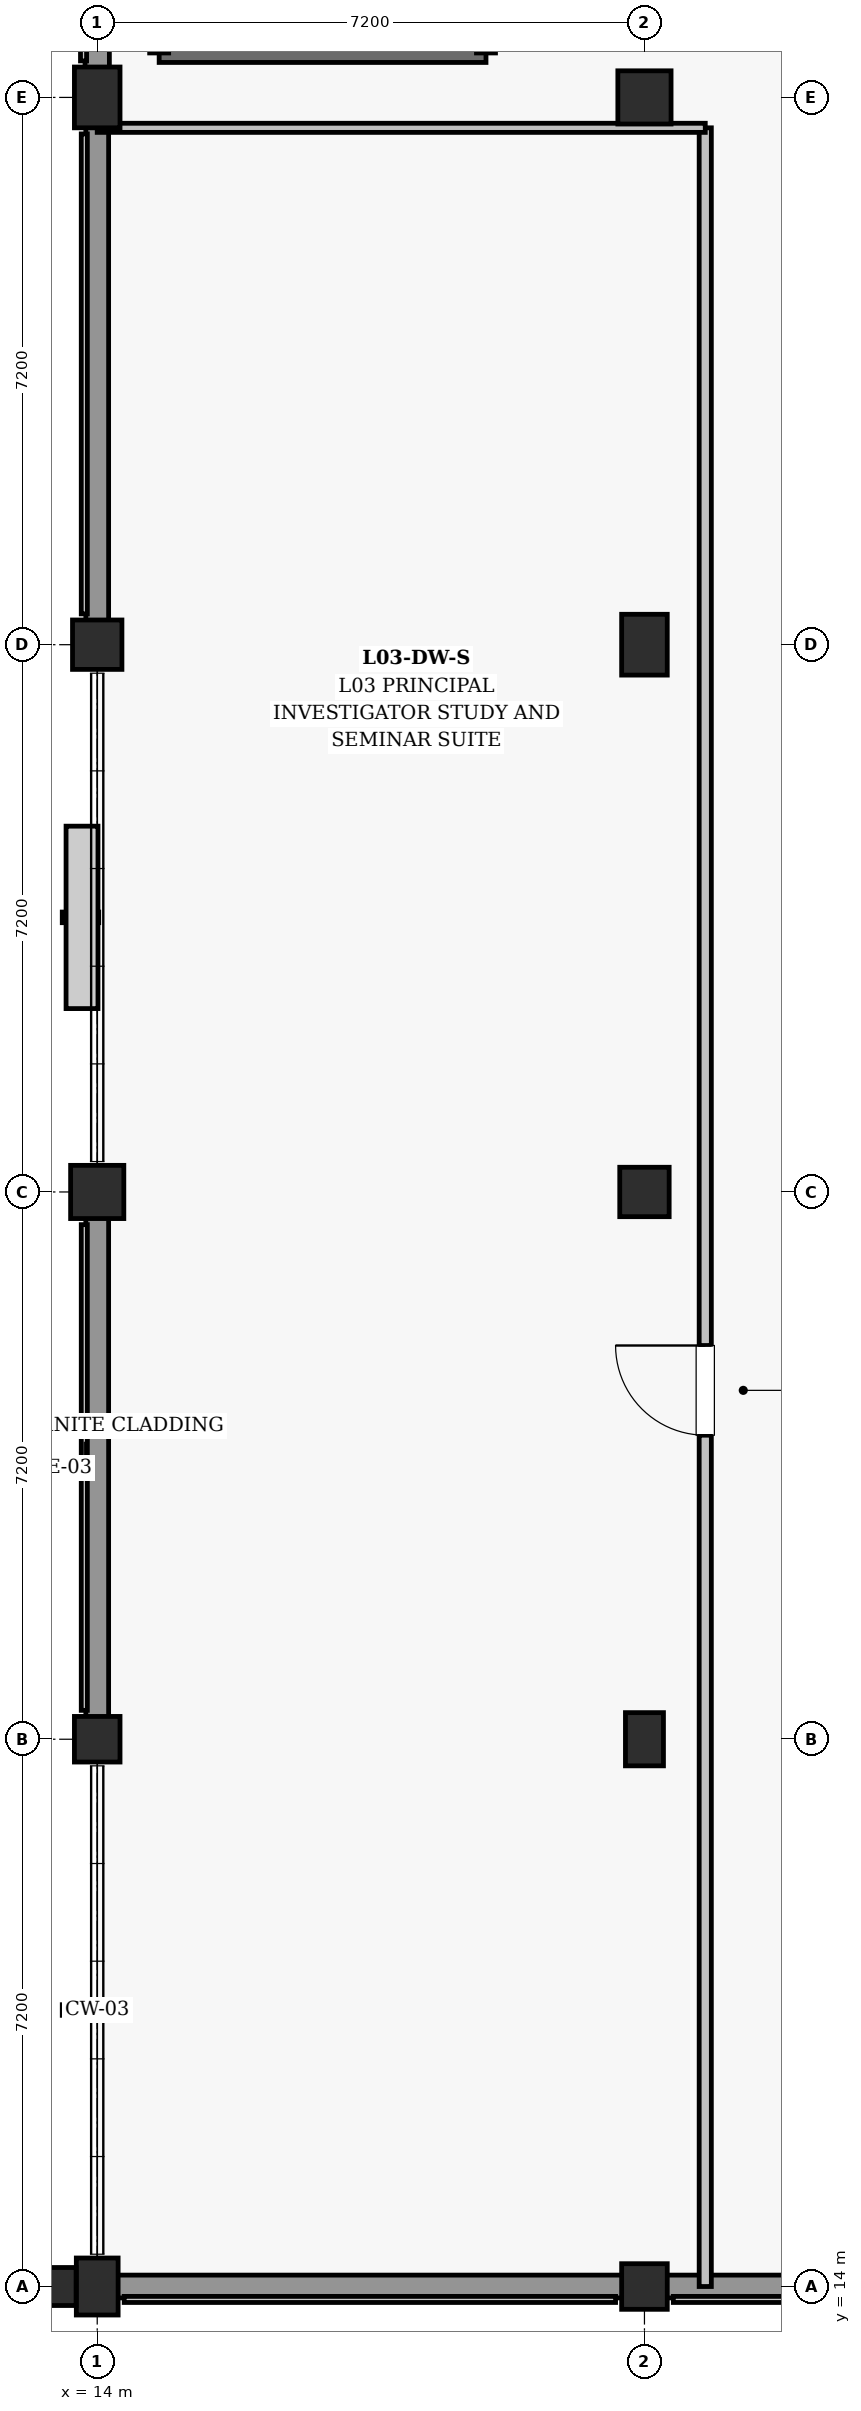
"""IFC4 building model, lengths in metres.
Left out: names, types, materials, properties, quantities, classifications, styles, units other than length and angle.
Written with IfcOpenShell. Run it as: python <this file> out.ifc"""

import sys

from ifc_helpers import new_model, si_unit, direction, frame, frame_2d, origin, origin_2d, place, context, subcontext, project, spatial, rectangle, extrude, element, fill, save


model = new_model("IFC4")
c1 = context("Model", 3, precision=1e-05, world=origin(), true_north=direction((0.0, 1.0)))
c2 = subcontext(c1, "Body", "Model", "MODEL_VIEW")
j1 = project(units=[si_unit("LENGTHUNIT", "METRE"), si_unit("PLANEANGLEUNIT", "RADIAN")], contexts=[c1])
p1 = place(None, origin())
s1 = spatial("IfcSite", under=j1, at=p1, CompositionType="ELEMENT")
p2 = place(p1, origin())
s2 = spatial("IfcBuilding", under=s1, at=p2, CompositionType="ELEMENT")
p3 = place(p2, frame((0.0, 0.0, 14.4)))
s3 = spatial("IfcBuildingStorey", under=s2, at=p3, CompositionType="ELEMENT", Elevation=14.4)
p4 = place(p3, frame((14.0, 14.0, 0.0), z_axis=(0.0, 0.0, 1.0), x_axis=(1.0, 0.0, 0.0)))
e1 = element("IfcColumn", 1, at=p4, inside=s3, PredefinedType="COLUMN", context=c2, shape_type="SweptSolid", body=[
    extrude(rectangle(XDim=0.55, YDim=0.75, at=origin_2d()), origin(), (0.0, 0.0, 1.0), 4.5),
])
p5 = place(p3, frame((14.0, 21.2, 0.0), z_axis=(0.0, 0.0, 1.0), x_axis=(1.0, 0.0, 0.0)))
e2 = element("IfcColumn", 2, at=p5, inside=s3, PredefinedType="COLUMN", context=c2, shape_type="SweptSolid", body=[
    extrude(rectangle(XDim=0.6, YDim=0.6, at=origin_2d()), origin(), (0.0, 0.0, 1.0), 4.5),
])
p6 = place(p3, frame((14.0, 28.4, 0.0), z_axis=(0.0, 0.0, 1.0), x_axis=(1.0, 0.0, 0.0)))
e3 = element("IfcColumn", 3, at=p6, inside=s3, PredefinedType="COLUMN", context=c2, shape_type="SweptSolid", body=[
    extrude(rectangle(XDim=0.7, YDim=0.7, at=origin_2d()), origin(), (0.0, 0.0, 1.0), 4.5),
])
p7 = place(p3, frame((14.0, 35.6, 0.0), z_axis=(0.0, 0.0, 1.0), x_axis=(1.0, 0.0, 0.0)))
e4 = element("IfcColumn", 4, at=p7, inside=s3, PredefinedType="COLUMN", context=c2, shape_type="SweptSolid", body=[
    extrude(rectangle(XDim=0.65, YDim=0.65, at=origin_2d()), origin(), (0.0, 0.0, 1.0), 4.5),
])
p8 = place(p3, frame((14.0, 42.8, 0.0), z_axis=(0.0, 0.0, 1.0), x_axis=(1.0, 0.0, 0.0)))
e5 = element("IfcColumn", 5, at=p8, inside=s3, PredefinedType="COLUMN", context=c2, shape_type="SweptSolid", body=[
    extrude(rectangle(XDim=0.6, YDim=0.8, at=origin_2d()), origin(), (0.0, 0.0, 1.0), 4.5),
])
p9 = place(p3, frame((21.2, 14.0, 0.0), z_axis=(0.0, 0.0, 1.0), x_axis=(1.0, 0.0, 0.0)))
e6 = element("IfcColumn", 6, at=p9, inside=s3, PredefinedType="COLUMN", context=c2, shape_type="SweptSolid", body=[
    extrude(rectangle(XDim=0.6, YDim=0.6, at=origin_2d()), origin(), (0.0, 0.0, 1.0), 4.5),
])
p10 = place(p3, frame((21.2, 21.2, 0.0), z_axis=(0.0, 0.0, 1.0), x_axis=(1.0, 0.0, 0.0)))
e7 = element("IfcColumn", 7, at=p10, inside=s3, PredefinedType="COLUMN", context=c2, shape_type="SweptSolid", body=[
    extrude(rectangle(XDim=0.5, YDim=0.7, at=origin_2d()), origin(), (0.0, 0.0, 1.0), 4.5),
])
p11 = place(p3, frame((21.2, 28.4, 0.0), z_axis=(0.0, 0.0, 1.0), x_axis=(1.0, 0.0, 0.0)))
e8 = element("IfcColumn", 8, at=p11, inside=s3, PredefinedType="COLUMN", context=c2, shape_type="SweptSolid", body=[
    extrude(rectangle(XDim=0.65, YDim=0.65, at=origin_2d()), origin(), (0.0, 0.0, 1.0), 4.5),
])
p12 = place(p3, frame((21.2, 35.6, 0.0), z_axis=(0.0, 0.0, 1.0), x_axis=(1.0, 0.0, 0.0)))
e9 = element("IfcColumn", 9, at=p12, inside=s3, PredefinedType="COLUMN", context=c2, shape_type="SweptSolid", body=[
    extrude(rectangle(XDim=0.6, YDim=0.8, at=origin_2d()), origin(), (0.0, 0.0, 1.0), 4.5),
])
p13 = place(p3, frame((21.2, 42.8, 0.0), z_axis=(0.0, 0.0, 1.0), x_axis=(1.0, 0.0, 0.0)))
e10 = element("IfcColumn", 10, at=p13, inside=s3, PredefinedType="COLUMN", context=c2, shape_type="SweptSolid", body=[
    extrude(rectangle(XDim=0.7, YDim=0.7, at=origin_2d()), origin(), (0.0, 0.0, 1.0), 4.5),
])
p14 = place(p3, frame((13.347, 14.0, 0.0), z_axis=(0.0, 0.0, 1.0), x_axis=(0.0, 1.0, 0.0)))
e11 = element("IfcColumn", 11, at=p14, inside=s3, PredefinedType="PILASTER", context=c2, shape_type="SweptSolid", body=[
    extrude(rectangle(XDim=0.5, YDim=0.75, at=origin_2d()), origin(), (0.0, 0.0, 1.0), 4.5),
])
p15 = place(p3, frame((14.0, 21.48, 0.0), z_axis=(0.0, 0.0, 1.0), x_axis=(0.0, 1.0, 0.0)))
e12 = element("IfcWall", 12, at=p15, inside=s3, PredefinedType="SOLIDWALL", context=c2, shape_type="SweptSolid", body=[
    extrude(rectangle(XDim=6.59, YDim=0.3, at=frame_2d((3.295, 0.0))), origin(), (0.0, 0.0, 1.0), 3.455),
])
p16 = place(p3, frame((14.0, 35.905, 0.0), z_axis=(0.0, 0.0, 1.0), x_axis=(0.0, 1.0, 0.0)))
e13 = element("IfcWall", 13, at=p16, inside=s3, PredefinedType="SOLIDWALL", context=c2, shape_type="SweptSolid", body=[
    extrude(rectangle(XDim=6.515, YDim=0.3, at=frame_2d((3.257, 0.0))), origin(), (0.0, 0.0, 1.0), 3.375),
])
p17 = place(p3, frame((14.0, 43.18, 0.0), z_axis=(0.0, 0.0, 1.0), x_axis=(0.0, 1.0, 0.0)))
e14 = element("IfcWall", 14, at=p17, inside=s3, PredefinedType="SOLIDWALL", context=c2, shape_type="SweptSolid", body=[
    extrude(rectangle(XDim=6.515, YDim=0.32, at=frame_2d((3.258, 0.0))), origin(), (0.0, 0.0, 1.0), 3.375),
])
p18 = place(p3, frame((14.255, 14.0, 0.0), z_axis=(0.0, 0.0, 1.0), x_axis=(1.0, 0.0, 0.0)))
e15 = element("IfcWall", 15, at=p18, inside=s3, PredefinedType="SOLIDWALL", context=c2, shape_type="SweptSolid", body=[
    extrude(rectangle(XDim=6.665, YDim=0.3, at=frame_2d((3.333, 0.0))), origin(), (0.0, 0.0, 1.0), 3.575),
])
p19 = place(p3, frame((21.48, 14.0, 0.0), z_axis=(0.0, 0.0, 1.0), x_axis=(1.0, 0.0, 0.0)))
e16 = element("IfcWall", 16, at=p19, inside=s3, PredefinedType="SOLIDWALL", context=c2, shape_type="SweptSolid", body=[
    extrude(rectangle(XDim=6.69, YDim=0.3, at=frame_2d((3.345, 0.0))), origin(), (0.0, 0.0, 1.0), 3.475),
])
p20 = place(p3, frame((14.815, 43.385, 0.0), z_axis=(0.0, 0.0, 1.0), x_axis=(1.0, 0.0, 0.0)))
e17 = element("IfcWall", 17, at=p20, inside=s3, PredefinedType="SHEAR", context=c2, shape_type="SweptSolid", body=[
    extrude(rectangle(XDim=4.3, YDim=0.25, at=frame_2d((2.15, 0.0))), origin(), (0.0, 0.0, 1.0), 4.195),
])
p21 = place(p3, frame((19.115, 43.385, 0.0), z_axis=(0.0, 0.0, 1.0), x_axis=(0.0, 1.0, 0.0)))
e18 = element("IfcWall", 18, at=p21, inside=s3, PredefinedType="SHEAR", context=c2, shape_type="SweptSolid", body=[
    extrude(rectangle(XDim=10.63, YDim=0.25, at=frame_2d((5.315, 0.0))), origin(), (0.0, 0.0, 1.0), 4.195),
])
p22 = place(p21, frame((0.55, 0.0, 0.0)))
e19 = element("IfcOpeningElement", 19, at=p22, cuts=e18, PredefinedType="OPENING", context=c2, shape_type="SweptSolid", body=[
    extrude(rectangle(XDim=1.2, YDim=2.15, at=frame_2d((0.6, 1.075))), frame((0.0, 0.135, 0.0), z_axis=(0.0, -1.0, 0.0), x_axis=(1.0, 0.0, 0.0)), (0.0, 0.0, 1.0), 0.27),
])
p23 = place(p3, frame((14.815, 54.015, 0.0), z_axis=(0.0, 0.0, 1.0), x_axis=(0.0, -1.0, 0.0)))
e20 = element("IfcWall", 20, at=p23, inside=s3, PredefinedType="SHEAR", context=c2, shape_type="SweptSolid", body=[
    extrude(rectangle(XDim=10.63, YDim=0.25, at=frame_2d((5.315, 0.0))), origin(), (0.0, 0.0, 1.0), 4.195),
])
p24 = place(p3, frame((22.0, 14.0, 0.0), z_axis=(0.0, 0.0, 1.0), x_axis=(0.0, 1.0, 0.0)))
e21 = element("IfcWall", 21, at=p24, inside=s3, PredefinedType="PARTITIONING", context=c2, shape_type="SweptSolid", body=[
    extrude(rectangle(XDim=28.4, YDim=0.16, at=frame_2d((14.2, 0.0))), origin(), (0.0, 0.0, 1.0), 3.48),
])
p25 = place(p24, frame((11.2, 0.0, 0.0)))
e22 = element("IfcOpeningElement", 22, at=p25, cuts=e21, PredefinedType="OPENING", context=c2, shape_type="SweptSolid", body=[
    extrude(rectangle(XDim=1.18, YDim=2.2, at=frame_2d((0.59, 1.1))), frame((0.0, 0.09, 0.0), z_axis=(0.0, -1.0, 0.0), x_axis=(1.0, 0.0, 0.0)), (0.0, 0.0, 1.0), 0.18),
])
p26 = place(p3, frame((14.0, 42.4, 0.0), z_axis=(0.0, 0.0, 1.0), x_axis=(1.0, 0.0, 0.0)))
e23 = element("IfcWall", 23, at=p26, inside=s3, PredefinedType="PARTITIONING", context=c2, shape_type="SweptSolid", body=[
    extrude(rectangle(XDim=8.0, YDim=0.12, at=frame_2d((4.0, 0.0))), origin(), (0.0, 0.0, 1.0), 3.58),
])
p27 = place(p25, origin())
e24 = element("IfcDoor", 24, at=p27, inside=s3, OperationType="SINGLE_SWING_RIGHT", PredefinedType="DOOR", context=c2, shape_type="SweptSolid", body=[
    extrude(rectangle(XDim=1.18, YDim=2.2, at=frame_2d((0.59, 1.1))), frame((0.0, 0.025, 0.0), z_axis=(0.0, -1.0, 0.0), x_axis=(1.0, 0.0, 0.0)), (0.0, 0.0, 1.0), 0.05),
])
fill(e22, e24)
save(model, sys.argv[1])
